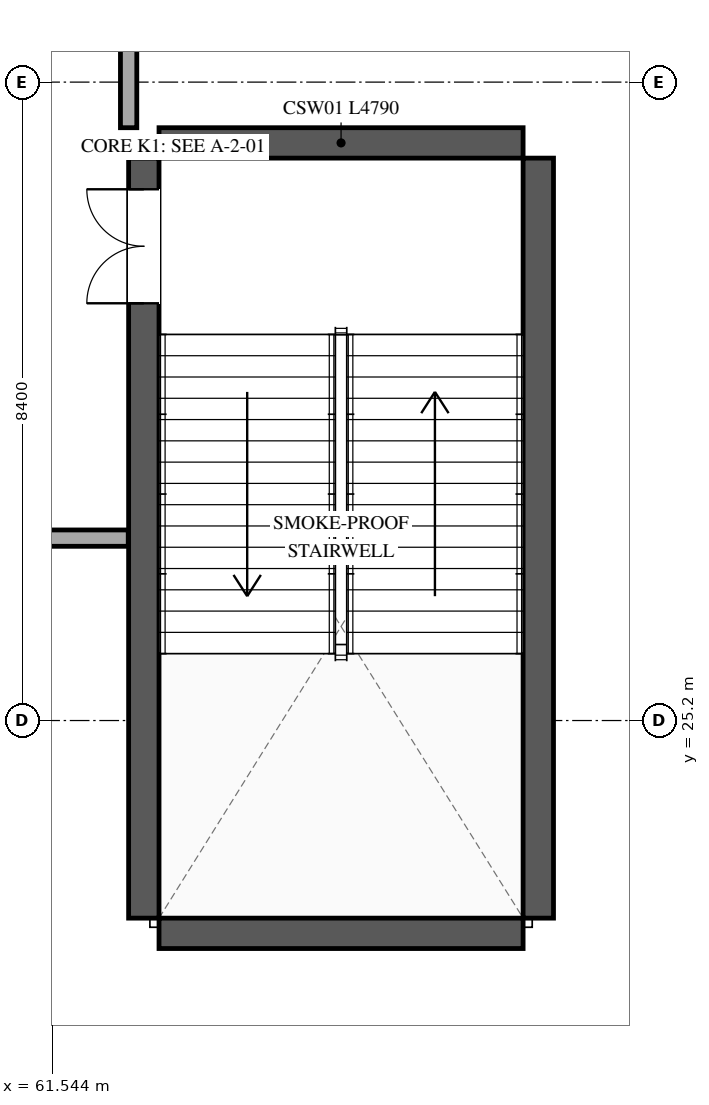
"""IFC4 building model, lengths in metres.
Left out: names, types, materials, properties, quantities, classifications, styles, units other than length and angle.
Written with IfcOpenShell. Run it as: python <this file> out.ifc"""

import sys

from ifc_helpers import new_model, si_unit, direction, frame, frame_2d, origin, place, context, subcontext, project, spatial, rectangle, extrude, element, fill, save


model = new_model("IFC4")
c1 = context("Model", 3, precision=1e-05, world=origin(), true_north=direction((0.0, 1.0)))
c2 = subcontext(c1, "Body", "Model", "MODEL_VIEW")
j1 = project(units=[si_unit("LENGTHUNIT", "METRE"), si_unit("PLANEANGLEUNIT", "RADIAN")], contexts=[c1])
p1 = place(None, origin())
s1 = spatial("IfcSite", under=j1, at=p1, CompositionType="ELEMENT")
p2 = place(p1, origin())
s2 = spatial("IfcBuilding", under=s1, at=p2, CompositionType="ELEMENT")
p3 = place(p2, frame((0.0, 0.0, 26.7)))
s3 = spatial("IfcBuildingStorey", under=s2, at=p3, CompositionType="ELEMENT", Elevation=26.7)
p4 = place(p3, frame((62.75, 22.6, 0.0), z_axis=(0.0, 0.0, 1.0), x_axis=(0.0, 1.0, 0.0)))
e1 = element("IfcWall", 1, at=p4, inside=s3, PredefinedType="SHEAR", context=c2, shape_type="SweptSolid", body=[
    extrude(rectangle(XDim=10.0, YDim=0.4, at=frame_2d((5.0, 0.0))), origin(), (0.0, 0.0, 1.0), 4.8),
])
p5 = place(p4, frame((8.09, 0.0, 0.0)))
e2 = element("IfcOpeningElement", 2, at=p5, cuts=e1, PredefinedType="OPENING", context=c2, shape_type="SweptSolid", body=[
    extrude(rectangle(XDim=1.5, YDim=2.2, at=frame_2d((0.75, 1.1))), frame((0.0, 0.21, 0.0), z_axis=(0.0, -1.0, 0.0), x_axis=(1.0, 0.0, 0.0)), (0.0, 0.0, 1.0), 0.42),
])
p6 = place(p3, frame((67.94, 32.6, 0.0), z_axis=(0.0, 0.0, 1.0), x_axis=(0.0, -1.0, 0.0)))
e3 = element("IfcWall", 3, at=p6, inside=s3, PredefinedType="SHEAR", context=c2, shape_type="SweptSolid", body=[
    extrude(rectangle(XDim=10.0, YDim=0.4, at=frame_2d((5.0, 0.0))), origin(), (0.0, 0.0, 1.0), 4.8),
])
for number, where, z_axis, x_axis in (
    (4, (67.74, 22.4, 0.0), (0.0, 0.0, 1.0), (-1.0, 0.0, 0.0)),
    (5, (62.95, 32.8, 0.0), (0.0, 0.0, 1.0), (1.0, 0.0, 0.0)),
):
    element("IfcWall", number, at=place(p3, frame(where, z_axis=z_axis, x_axis=x_axis)), inside=s3, PredefinedType="SHEAR", context=c2, shape_type="SweptSolid", body=[
        extrude(rectangle(XDim=4.79, YDim=0.4, at=frame_2d((2.395, 0.0))), origin(), (0.0, 0.0, 1.0), 4.8),
    ])
p7 = place(p3, frame((62.545, 27.6, 0.0), z_axis=(0.0, 0.0, 1.0), x_axis=(-1.0, 0.0, 0.0)))
e6 = element("IfcWall", 6, at=p7, inside=s3, PredefinedType="PARTITIONING", context=c2, shape_type="SweptSolid", body=[
    extrude(rectangle(XDim=5.745, YDim=0.215, at=frame_2d((2.873, 0.0))), origin(), (0.0, 0.0, 1.0), 3.76),
])
p8 = place(p3, frame((62.55, 35.0, 0.0), z_axis=(0.0, 0.0, 1.0), x_axis=(0.0, -1.0, 0.0)))
e7 = element("IfcWall", 7, at=p8, inside=s3, PredefinedType="PARTITIONING", context=c2, shape_type="SweptSolid", body=[
    extrude(rectangle(XDim=2.0, YDim=0.215, at=frame_2d((1.0, 0.0))), origin(), (0.0, 0.0, 1.0), 3.76),
])
p9 = place(p5, origin())
e8 = element("IfcDoor", 8, at=p9, inside=s3, OperationType="DOUBLE_DOOR_SINGLE_SWING", PredefinedType="DOOR", context=c2, shape_type="SweptSolid", body=[
    extrude(rectangle(XDim=1.5, YDim=2.2, at=frame_2d((0.75, 1.1))), frame((0.0, 0.025, 0.0), z_axis=(0.0, -1.0, 0.0), x_axis=(1.0, 0.0, 0.0)), (0.0, 0.0, 1.0), 0.05),
])
fill(e2, e8)
save(model, sys.argv[1])
